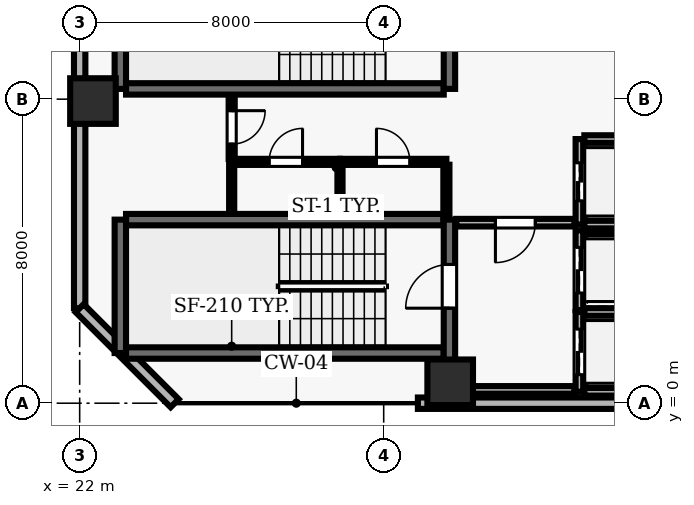
"""IFC4 building model, lengths in metres.
Left out: names, types, materials, properties, quantities, classifications, styles, units other than length and angle.
Written with IfcOpenShell. Run it as: python <this file> out.ifc"""

import sys

from ifc_helpers import new_model, si_unit, direction, frame, frame_2d, origin, origin_2d, place, context, subcontext, project, spatial, rectangle, extrude, element, fill, save


model = new_model("IFC4")
c1 = context("Model", 3, precision=1e-05, world=origin(), true_north=direction((0.0, 1.0)))
c2 = subcontext(c1, "Body", "Model", "MODEL_VIEW")
j1 = project(units=[si_unit("LENGTHUNIT", "METRE"), si_unit("PLANEANGLEUNIT", "RADIAN")], contexts=[c1])
p1 = place(None, origin())
s1 = spatial("IfcSite", under=j1, at=p1, CompositionType="ELEMENT")
p2 = place(p1, origin())
s2 = spatial("IfcBuilding", under=s1, at=p2, CompositionType="ELEMENT")
p3 = place(p2, frame((0.0, 0.0, 142.4)))
s3 = spatial("IfcBuildingStorey", under=s2, at=p3, CompositionType="ELEMENT", Elevation=142.4)
for number, where, z_axis, x_axis in (
    (1, (31.75, 0.55, 0.0), (0.0, 0.0, 1.0), (1.0, 0.0, 0.0)),
    (2, (22.35, 7.95, 0.0), (0.0, 0.0, 1.0), (1.0, 0.0, 0.0)),
):
    element("IfcColumn", number, at=place(p3, frame(where, z_axis=z_axis, x_axis=x_axis)), inside=s3, PredefinedType="COLUMN", context=c2, shape_type="SweptSolid", body=[
        extrude(rectangle(XDim=1.2, YDim=1.2, at=origin_2d()), origin(), (0.0, 0.0, 1.0), 3.9),
    ])
p4 = place(p3, frame((30.9, 0.0, 0.0), z_axis=(0.0, 0.0, 1.0), x_axis=(1.0, 0.0, 0.0)))
e3 = element("IfcWall", 3, at=p4, inside=s3, PredefinedType="SOLIDWALL", context=c2, shape_type="SweptSolid", body=[
    extrude(rectangle(XDim=7.6, YDim=0.3, at=frame_2d((3.8, 0.0))), origin(), (0.0, 0.0, 1.0), 3.69),
])
p5 = place(p3, frame((22.0, 46.1, 0.0), z_axis=(0.0, 0.0, 1.0), x_axis=(0.0, -1.0, 0.0)))
e4 = element("IfcWall", 4, at=p5, inside=s3, PredefinedType="SOLIDWALL", context=c2, shape_type="SweptSolid", body=[
    extrude(rectangle(XDim=43.6, YDim=0.3, at=frame_2d((21.8, 0.0))), origin(), (0.0, 0.0, 1.0), 3.69),
])
p6 = place(p5, frame((12.7, 0.0, 0.0)))
e5 = element("IfcOpeningElement", 5, at=p6, cuts=e4, PredefinedType="OPENING", context=c2, shape_type="SweptSolid", body=[
    extrude(rectangle(XDim=1.0, YDim=2.2, at=frame_2d((0.5, 1.1))), frame((0.0, 0.16, 0.0), z_axis=(0.0, -1.0, 0.0), x_axis=(1.0, 0.0, 0.0)), (0.0, 0.0, 1.0), 0.32),
])
p7 = place(p5, frame((1.525, 0.0, 0.9)))
e6 = element("IfcOpeningElement", 6, at=p7, cuts=e4, PredefinedType="OPENING", context=c2, shape_type="SweptSolid", body=[
    extrude(rectangle(XDim=2.4, YDim=2.2, at=frame_2d((1.2, 1.1))), frame((0.0, 0.16, 0.0), z_axis=(0.0, -1.0, 0.0), x_axis=(1.0, 0.0, 0.0)), (0.0, 0.0, 1.0), 0.32),
])
p8 = place(p5, frame((6.975, 0.0, 0.9)))
e7 = element("IfcOpeningElement", 7, at=p8, cuts=e4, PredefinedType="OPENING", context=c2, shape_type="SweptSolid", body=[
    extrude(rectangle(XDim=2.4, YDim=2.2, at=frame_2d((1.2, 1.1))), frame((0.0, 0.16, 0.0), z_axis=(0.0, -1.0, 0.0), x_axis=(1.0, 0.0, 0.0)), (0.0, 0.0, 1.0), 0.32),
])
p9 = place(p5, frame((16.975, 0.0, 0.9)))
e8 = element("IfcOpeningElement", 8, at=p9, cuts=e4, PredefinedType="OPENING", context=c2, shape_type="SweptSolid", body=[
    extrude(rectangle(XDim=2.4, YDim=2.2, at=frame_2d((1.2, 1.1))), frame((0.0, 0.16, 0.0), z_axis=(0.0, -1.0, 0.0), x_axis=(1.0, 0.0, 0.0)), (0.0, 0.0, 1.0), 0.32),
])
p10 = place(p5, frame((23.775, 0.0, 0.9)))
e9 = element("IfcOpeningElement", 9, at=p10, cuts=e4, PredefinedType="OPENING", context=c2, shape_type="SweptSolid", body=[
    extrude(rectangle(XDim=2.4, YDim=2.2, at=frame_2d((1.2, 1.1))), frame((0.0, 0.16, 0.0), z_axis=(0.0, -1.0, 0.0), x_axis=(1.0, 0.0, 0.0)), (0.0, 0.0, 1.0), 0.32),
])
p11 = place(p5, frame((27.875, 0.0, 0.9)))
e10 = element("IfcOpeningElement", 10, at=p11, cuts=e4, PredefinedType="OPENING", context=c2, shape_type="SweptSolid", body=[
    extrude(rectangle(XDim=2.4, YDim=2.2, at=frame_2d((1.2, 1.1))), frame((0.0, 0.16, 0.0), z_axis=(0.0, -1.0, 0.0), x_axis=(1.0, 0.0, 0.0)), (0.0, 0.0, 1.0), 0.32),
])
p12 = place(p5, frame((34.225, 0.0, 0.9)))
e11 = element("IfcOpeningElement", 11, at=p12, cuts=e4, PredefinedType="OPENING", context=c2, shape_type="SweptSolid", body=[
    extrude(rectangle(XDim=2.4, YDim=2.2, at=frame_2d((1.2, 1.1))), frame((0.0, 0.16, 0.0), z_axis=(0.0, -1.0, 0.0), x_axis=(1.0, 0.0, 0.0)), (0.0, 0.0, 1.0), 0.32),
])
p13 = place(p3, frame((22.0, 2.5, 0.0), z_axis=(0.0, 0.0, 1.0), x_axis=(0.707106781187, -0.707106781187, 0.0)))
e12 = element("IfcWall", 12, at=p13, inside=s3, PredefinedType="SOLIDWALL", context=c2, shape_type="SweptSolid", body=[
    extrude(rectangle(XDim=3.536, YDim=0.3, at=frame_2d((1.768, 0.0))), origin(), (0.0, 0.0, 1.0), 3.69),
])
p14 = place(p3, frame((31.58, 4.83, 0.0), z_axis=(0.0, 0.0, 1.0), x_axis=(-1.0, 0.0, 0.0)))
e13 = element("IfcWall", 13, at=p14, inside=s3, PredefinedType="SHEAR", context=c2, shape_type="SweptSolid", body=[
    extrude(rectangle(XDim=8.36, YDim=0.3, at=frame_2d((4.18, 0.0))), origin(), (0.0, 0.0, 1.0), 3.69),
])
p15 = place(p3, frame((23.07, 4.83, 0.0), z_axis=(0.0, 0.0, 1.0), x_axis=(0.0, -1.0, 0.0)))
e14 = element("IfcWall", 14, at=p15, inside=s3, PredefinedType="SHEAR", context=c2, shape_type="SweptSolid", body=[
    extrude(rectangle(XDim=3.51, YDim=0.3, at=frame_2d((1.755, 0.0))), origin(), (0.0, 0.0, 1.0), 3.69),
])
p16 = place(p3, frame((23.22, 1.32, 0.0), z_axis=(0.0, 0.0, 1.0), x_axis=(1.0, 0.0, 0.0)))
e15 = element("IfcWall", 15, at=p16, inside=s3, PredefinedType="SHEAR", context=c2, shape_type="SweptSolid", body=[
    extrude(rectangle(XDim=8.36, YDim=0.3, at=frame_2d((4.18, 0.0))), origin(), (0.0, 0.0, 1.0), 3.69),
])
p17 = place(p3, frame((31.73, 0.96, 0.0), z_axis=(0.0, 0.0, 1.0), x_axis=(0.0, 1.0, 0.0)))
e16 = element("IfcWall", 16, at=p17, inside=s3, PredefinedType="SHEAR", context=c2, shape_type="SweptSolid", body=[
    extrude(rectangle(XDim=3.87, YDim=0.3, at=frame_2d((1.935, 0.0))), origin(), (0.0, 0.0, 1.0), 3.69),
])
p18 = place(p17, frame((1.54, 0.0, 0.0)))
e17 = element("IfcOpeningElement", 17, at=p18, cuts=e16, PredefinedType="OPENING", context=c2, shape_type="SweptSolid", body=[
    extrude(rectangle(XDim=1.15, YDim=2.15, at=frame_2d((0.575, 1.075))), frame((0.0, 0.16, 0.0), z_axis=(0.0, -1.0, 0.0), x_axis=(1.0, 0.0, 0.0)), (0.0, 0.0, 1.0), 0.32),
])
p19 = place(p3, frame((23.07, 11.78, 0.0), z_axis=(0.0, 0.0, 1.0), x_axis=(0.0, -1.0, 0.0)))
e18 = element("IfcWall", 18, at=p19, inside=s3, PredefinedType="SHEAR", context=c2, shape_type="SweptSolid", body=[
    extrude(rectangle(XDim=3.51, YDim=0.3, at=frame_2d((1.755, 0.0))), origin(), (0.0, 0.0, 1.0), 3.69),
])
p20 = place(p3, frame((23.22, 8.27, 0.0), z_axis=(0.0, 0.0, 1.0), x_axis=(1.0, 0.0, 0.0)))
e19 = element("IfcWall", 19, at=p20, inside=s3, PredefinedType="SHEAR", context=c2, shape_type="SweptSolid", body=[
    extrude(rectangle(XDim=8.36, YDim=0.3, at=frame_2d((4.18, 0.0))), origin(), (0.0, 0.0, 1.0), 3.69),
])
p21 = place(p3, frame((31.73, 8.27, 0.0), z_axis=(0.0, 0.0, 1.0), x_axis=(0.0, 1.0, 0.0)))
e20 = element("IfcWall", 20, at=p21, inside=s3, PredefinedType="SHEAR", context=c2, shape_type="SweptSolid", body=[
    extrude(rectangle(XDim=3.51, YDim=0.3, at=frame_2d((1.755, 0.0))), origin(), (0.0, 0.0, 1.0), 3.69),
])
p22 = place(p21, frame((1.18, 0.0, 0.0)))
e21 = element("IfcOpeningElement", 21, at=p22, cuts=e20, PredefinedType="OPENING", context=c2, shape_type="SweptSolid", body=[
    extrude(rectangle(XDim=1.15, YDim=2.15, at=frame_2d((0.575, 1.075))), frame((0.0, 0.16, 0.0), z_axis=(0.0, -1.0, 0.0), x_axis=(1.0, 0.0, 0.0)), (0.0, 0.0, 1.0), 0.32),
])
p23 = place(p3, frame((35.15, 2.4, 0.0), z_axis=(0.0, 0.0, 1.0), x_axis=(0.0, -1.0, 0.0)))
e22 = element("IfcWall", 22, at=p23, inside=s3, PredefinedType="SOLIDWALL", context=c2, shape_type="SweptSolid", body=[
    extrude(rectangle(XDim=2.1, YDim=0.2, at=frame_2d((1.05, 0.0))), origin(), (0.0, 0.0, 1.0), 3.69),
])
p24 = place(p23, frame((0.45, 0.0, 0.0)))
e23 = element("IfcOpeningElement", 23, at=p24, cuts=e22, PredefinedType="OPENING", context=c2, shape_type="SweptSolid", body=[
    extrude(rectangle(XDim=1.2, YDim=2.15, at=frame_2d((0.6, 1.075))), frame((0.0, 0.11, 0.0), z_axis=(0.0, -1.0, 0.0), x_axis=(1.0, 0.0, 0.0)), (0.0, 0.0, 1.0), 0.22),
])
for number, where, z_axis, x_axis in (
    (24, (35.28, 0.3, 0.0), (0.0, 0.0, 1.0), (1.0, 0.0, 0.0)),
    (25, (37.42, 2.4, 0.0), (0.0, 0.0, 1.0), (-1.0, 0.0, 0.0)),
):
    element("IfcWall", number, at=place(p3, frame(where, z_axis=z_axis, x_axis=x_axis)), inside=s3, PredefinedType="SOLIDWALL", context=c2, shape_type="SweptSolid", body=[
        extrude(rectangle(XDim=2.14, YDim=0.2, at=frame_2d((1.07, 0.0))), origin(), (0.0, 0.0, 1.0), 3.69),
    ])
p25 = place(p3, frame((35.15, 4.55, 0.0), z_axis=(0.0, 0.0, 1.0), x_axis=(0.0, -1.0, 0.0)))
e26 = element("IfcWall", 26, at=p25, inside=s3, PredefinedType="SOLIDWALL", context=c2, shape_type="SweptSolid", body=[
    extrude(rectangle(XDim=2.1, YDim=0.2, at=frame_2d((1.05, 0.0))), origin(), (0.0, 0.0, 1.0), 3.69),
])
p26 = place(p25, frame((0.45, 0.0, 0.0)))
e27 = element("IfcOpeningElement", 27, at=p26, cuts=e26, PredefinedType="OPENING", context=c2, shape_type="SweptSolid", body=[
    extrude(rectangle(XDim=1.2, YDim=2.15, at=frame_2d((0.6, 1.075))), frame((0.0, 0.11, 0.0), z_axis=(0.0, -1.0, 0.0), x_axis=(1.0, 0.0, 0.0)), (0.0, 0.0, 1.0), 0.22),
])
p27 = place(p3, frame((37.42, 4.55, 0.0), z_axis=(0.0, 0.0, 1.0), x_axis=(-1.0, 0.0, 0.0)))
e28 = element("IfcWall", 28, at=p27, inside=s3, PredefinedType="SOLIDWALL", context=c2, shape_type="SweptSolid", body=[
    extrude(rectangle(XDim=2.14, YDim=0.2, at=frame_2d((1.07, 0.0))), origin(), (0.0, 0.0, 1.0), 3.69),
])
p28 = place(p3, frame((35.15, 6.95, 0.0), z_axis=(0.0, 0.0, 1.0), x_axis=(0.0, -1.0, 0.0)))
e29 = element("IfcWall", 29, at=p28, inside=s3, PredefinedType="SOLIDWALL", context=c2, shape_type="SweptSolid", body=[
    extrude(rectangle(XDim=2.25, YDim=0.2, at=frame_2d((1.125, 0.0))), origin(), (0.0, 0.0, 1.0), 3.69),
])
p29 = place(p28, frame((0.625, 0.0, 0.0)))
e30 = element("IfcOpeningElement", 30, at=p29, cuts=e29, PredefinedType="OPENING", context=c2, shape_type="SweptSolid", body=[
    extrude(rectangle(XDim=1.0, YDim=2.1, at=frame_2d((0.5, 1.05))), frame((0.0, 0.11, 0.0), z_axis=(0.0, -1.0, 0.0), x_axis=(1.0, 0.0, 0.0)), (0.0, 0.0, 1.0), 0.22),
])
for number, where, z_axis, x_axis in (
    (31, (35.28, 4.7, 0.0), (0.0, 0.0, 1.0), (1.0, 0.0, 0.0)),
    (32, (37.42, 6.95, 0.0), (0.0, 0.0, 1.0), (-1.0, 0.0, 0.0)),
):
    element("IfcWall", number, at=place(p3, frame(where, z_axis=z_axis, x_axis=x_axis)), inside=s3, PredefinedType="SOLIDWALL", context=c2, shape_type="SweptSolid", body=[
        extrude(rectangle(XDim=2.14, YDim=0.2, at=frame_2d((1.07, 0.0))), origin(), (0.0, 0.0, 1.0), 3.69),
    ])
p30 = place(p3, frame((26.0, 6.35, 0.0), z_axis=(0.0, 0.0, 1.0), x_axis=(1.0, 0.0, 0.0)))
e33 = element("IfcWall", 33, at=p30, inside=s3, PredefinedType="PARTITIONING", context=c2, shape_type="SweptSolid", body=[
    extrude(rectangle(XDim=2.85, YDim=0.16, at=frame_2d((1.425, 0.0))), origin(), (0.0, 0.0, 1.0), 3.69),
])
p31 = place(p30, frame((0.985, 0.0, 0.0)))
e34 = element("IfcOpeningElement", 34, at=p31, cuts=e33, PredefinedType="OPENING", context=c2, shape_type="SweptSolid", body=[
    extrude(rectangle(XDim=0.88, YDim=2.1, at=frame_2d((0.44, 1.05))), frame((0.0, 0.09, 0.0), z_axis=(0.0, -1.0, 0.0), x_axis=(1.0, 0.0, 0.0)), (0.0, 0.0, 1.0), 0.18),
])
p32 = place(p3, frame((28.85, 6.35, 0.0), z_axis=(0.0, 0.0, 1.0), x_axis=(1.0, 0.0, 0.0)))
e35 = element("IfcWall", 35, at=p32, inside=s3, PredefinedType="PARTITIONING", context=c2, shape_type="SweptSolid", body=[
    extrude(rectangle(XDim=2.8, YDim=0.16, at=frame_2d((1.4, 0.0))), origin(), (0.0, 0.0, 1.0), 3.69),
])
p33 = place(p32, frame((0.96, 0.0, 0.0)))
e36 = element("IfcOpeningElement", 36, at=p33, cuts=e35, PredefinedType="OPENING", context=c2, shape_type="SweptSolid", body=[
    extrude(rectangle(XDim=0.88, YDim=2.1, at=frame_2d((0.44, 1.05))), frame((0.0, 0.09, 0.0), z_axis=(0.0, -1.0, 0.0), x_axis=(1.0, 0.0, 0.0)), (0.0, 0.0, 1.0), 0.18),
])
p34 = place(p3, frame((31.65, 0.35, 0.0), z_axis=(0.0, 0.0, 1.0), x_axis=(1.0, 0.0, 0.0)))
e37 = element("IfcWall", 37, at=p34, inside=s3, PredefinedType="SOLIDWALL", context=c2, shape_type="SweptSolid", body=[
    extrude(rectangle(XDim=3.37, YDim=0.2, at=frame_2d((1.685, 0.0))), origin(), (0.0, 0.0, 1.0), 3.69),
])
p35 = place(p3, frame((35.02, 4.75, 0.0), z_axis=(0.0, 0.0, 1.0), x_axis=(-1.0, 0.0, 0.0)))
e38 = element("IfcWall", 38, at=p35, inside=s3, PredefinedType="SOLIDWALL", context=c2, shape_type="SweptSolid", body=[
    extrude(rectangle(XDim=3.11, YDim=0.2, at=frame_2d((1.555, 0.0))), origin(), (0.0, 0.0, 1.0), 3.69),
])
p36 = place(p35, frame((1.03, 0.0, 0.0)))
e39 = element("IfcOpeningElement", 39, at=p36, cuts=e38, PredefinedType="OPENING", context=c2, shape_type="SweptSolid", body=[
    extrude(rectangle(XDim=1.05, YDim=2.15, at=frame_2d((0.525, 1.075))), frame((0.0, 0.11, 0.0), z_axis=(0.0, -1.0, 0.0), x_axis=(1.0, 0.0, 0.0)), (0.0, 0.0, 1.0), 0.22),
])
p37 = place(p3, frame((26.0, 5.01, 0.0), z_axis=(0.0, 0.0, 1.0), x_axis=(0.0, 1.0, 0.0)))
e40 = element("IfcWall", 40, at=p37, inside=s3, PredefinedType="PARTITIONING", context=c2, shape_type="SweptSolid", body=[
    extrude(rectangle(XDim=1.265, YDim=0.135, at=frame_2d((0.632, 0.0))), origin(), (0.0, 0.0, 1.0), 3.69),
])
p38 = place(p3, frame((26.0, 8.09, 0.0), z_axis=(0.0, 0.0, 1.0), x_axis=(0.0, -1.0, 0.0)))
e41 = element("IfcWall", 41, at=p38, inside=s3, PredefinedType="PARTITIONING", context=c2, shape_type="SweptSolid", body=[
    extrude(rectangle(XDim=1.665, YDim=0.16, at=frame_2d((0.833, 0.0))), origin(), (0.0, 0.0, 1.0), 3.69),
])
p39 = place(p38, frame((0.393, 0.0, 0.0)))
e42 = element("IfcOpeningElement", 42, at=p39, cuts=e41, PredefinedType="OPENING", context=c2, shape_type="SweptSolid", body=[
    extrude(rectangle(XDim=0.88, YDim=2.1, at=frame_2d((0.44, 1.05))), frame((0.0, 0.09, 0.0), z_axis=(0.0, -1.0, 0.0), x_axis=(1.0, 0.0, 0.0)), (0.0, 0.0, 1.0), 0.18),
])
p40 = place(p3, frame((28.85, 5.01, 0.0), z_axis=(0.0, 0.0, 1.0), x_axis=(0.0, 1.0, 0.0)))
e43 = element("IfcWall", 43, at=p40, inside=s3, PredefinedType="PARTITIONING", context=c2, shape_type="SweptSolid", body=[
    extrude(rectangle(XDim=1.265, YDim=0.135, at=frame_2d((0.632, 0.0))), origin(), (0.0, 0.0, 1.0), 3.69),
])
p41 = place(p3, frame((31.65, 4.86, 0.0), z_axis=(0.0, 0.0, 1.0), x_axis=(0.0, 1.0, 0.0)))
e44 = element("IfcWall", 44, at=p41, inside=s3, PredefinedType="PARTITIONING", context=c2, shape_type="SweptSolid", body=[
    extrude(rectangle(XDim=1.415, YDim=0.16, at=frame_2d((0.708, 0.0))), origin(), (0.0, 0.0, 1.0), 3.69),
])
p42 = place(p18, origin())
e45 = element("IfcDoor", 45, at=p42, inside=s3, OperationType="SINGLE_SWING_LEFT", PredefinedType="DOOR", context=c2, shape_type="SweptSolid", body=[
    extrude(rectangle(XDim=1.15, YDim=2.15, at=frame_2d((0.575, 1.075))), frame((0.0, 0.025, 0.0), z_axis=(0.0, -1.0, 0.0), x_axis=(1.0, 0.0, 0.0)), (0.0, 0.0, 1.0), 0.05),
])
fill(e17, e45)
p43 = place(p24, origin())
e46 = element("IfcDoor", 46, at=p43, inside=s3, OperationType="DOUBLE_DOOR_SLIDING", PredefinedType="DOOR", context=c2, shape_type="SweptSolid", body=[
    extrude(rectangle(XDim=1.2, YDim=2.15, at=frame_2d((0.6, 1.075))), frame((0.0, 0.025, 0.0), z_axis=(0.0, -1.0, 0.0), x_axis=(1.0, 0.0, 0.0)), (0.0, 0.0, 1.0), 0.05),
])
fill(e23, e46)
p44 = place(p26, origin())
e47 = element("IfcDoor", 47, at=p44, inside=s3, OperationType="DOUBLE_DOOR_SLIDING", PredefinedType="DOOR", context=c2, shape_type="SweptSolid", body=[
    extrude(rectangle(XDim=1.2, YDim=2.15, at=frame_2d((0.6, 1.075))), frame((0.0, 0.025, 0.0), z_axis=(0.0, -1.0, 0.0), x_axis=(1.0, 0.0, 0.0)), (0.0, 0.0, 1.0), 0.05),
])
fill(e27, e47)
p45 = place(p29, origin())
e48 = element("IfcDoor", 48, at=p45, inside=s3, OperationType="DOUBLE_DOOR_SLIDING", PredefinedType="DOOR", context=c2, shape_type="SweptSolid", body=[
    extrude(rectangle(XDim=1.0, YDim=2.1, at=frame_2d((0.5, 1.05))), frame((0.0, 0.025, 0.0), z_axis=(0.0, -1.0, 0.0), x_axis=(1.0, 0.0, 0.0)), (0.0, 0.0, 1.0), 0.05),
])
fill(e30, e48)
p46 = place(p36, origin())
e49 = element("IfcDoor", 49, at=p46, inside=s3, OperationType="SINGLE_SWING_RIGHT", PredefinedType="DOOR", context=c2, shape_type="SweptSolid", body=[
    extrude(rectangle(XDim=1.05, YDim=2.15, at=frame_2d((0.525, 1.075))), frame((0.0, 0.025, 0.0), z_axis=(0.0, -1.0, 0.0), x_axis=(1.0, 0.0, 0.0)), (0.0, 0.0, 1.0), 0.05),
])
fill(e39, e49)
p47 = place(p39, origin())
e50 = element("IfcDoor", 50, at=p47, inside=s3, OperationType="SINGLE_SWING_LEFT", PredefinedType="DOOR", context=c2, shape_type="SweptSolid", body=[
    extrude(rectangle(XDim=0.88, YDim=2.1, at=frame_2d((0.44, 1.05))), frame((0.0, 0.025, 0.0), z_axis=(0.0, -1.0, 0.0), x_axis=(1.0, 0.0, 0.0)), (0.0, 0.0, 1.0), 0.05),
])
fill(e42, e50)
p48 = place(p31, origin())
e51 = element("IfcDoor", 51, at=p48, inside=s3, OperationType="SINGLE_SWING_RIGHT", PredefinedType="DOOR", context=c2, shape_type="SweptSolid", body=[
    extrude(rectangle(XDim=0.88, YDim=2.1, at=frame_2d((0.44, 1.05))), frame((0.0, 0.025, 0.0), z_axis=(0.0, -1.0, 0.0), x_axis=(1.0, 0.0, 0.0)), (0.0, 0.0, 1.0), 0.05),
])
fill(e34, e51)
p49 = place(p33, origin())
e52 = element("IfcDoor", 52, at=p49, inside=s3, OperationType="SINGLE_SWING_LEFT", PredefinedType="DOOR", context=c2, shape_type="SweptSolid", body=[
    extrude(rectangle(XDim=0.88, YDim=2.1, at=frame_2d((0.44, 1.05))), frame((0.0, 0.025, 0.0), z_axis=(0.0, -1.0, 0.0), x_axis=(1.0, 0.0, 0.0)), (0.0, 0.0, 1.0), 0.05),
])
fill(e36, e52)
save(model, sys.argv[1])
